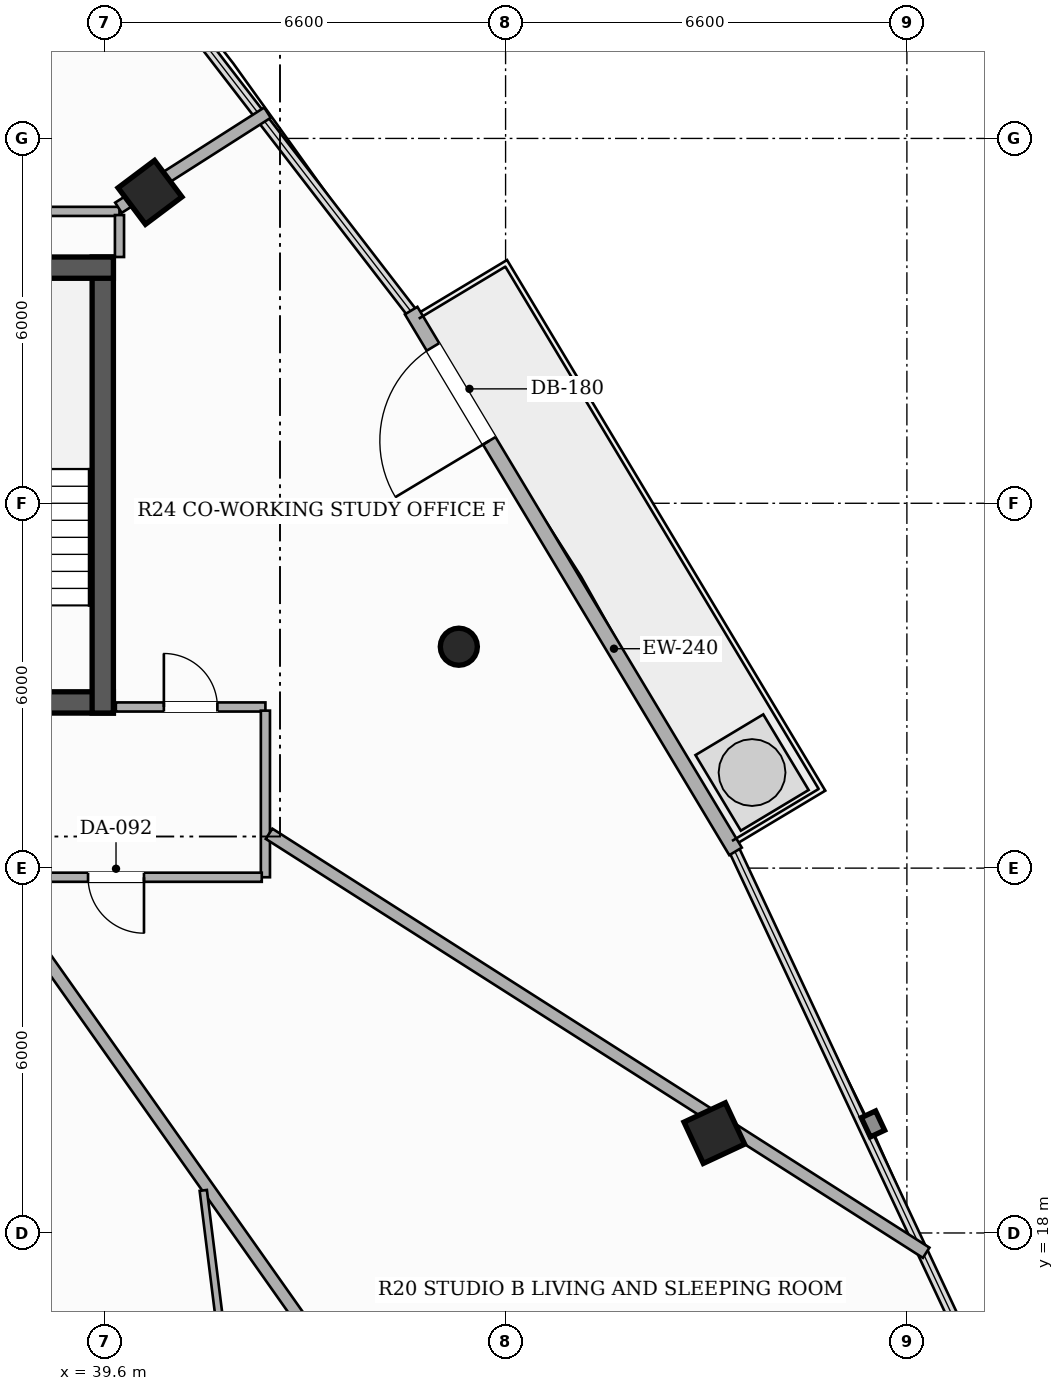
"""IFC4 building model, lengths in metres.
Left out: names, types, materials, properties, quantities, classifications, styles, units other than length and angle.
Written with IfcOpenShell. Run it as: python <this file> out.ifc"""

import sys

from ifc_helpers import new_model, si_unit, direction, frame, frame_2d, origin, origin_2d, place, context, subcontext, project, spatial, rectangle, hollow_rectangle, hollow_circle, extrude, element, fill, save


model = new_model("IFC4")
c1 = context("Model", 3, precision=1e-05, world=origin(), true_north=direction((0.0, 1.0)))
c2 = subcontext(c1, "Body", "Model", "MODEL_VIEW")
j1 = project(units=[si_unit("LENGTHUNIT", "METRE"), si_unit("PLANEANGLEUNIT", "RADIAN")], contexts=[c1])
p1 = place(None, origin())
s1 = spatial("IfcSite", under=j1, at=p1, CompositionType="ELEMENT")
p2 = place(p1, origin())
s2 = spatial("IfcBuilding", under=s1, at=p2, CompositionType="ELEMENT")
p3 = place(p2, frame((0.0, 0.0, 209.6)))
s3 = spatial("IfcBuildingStorey", under=s2, at=p3, CompositionType="ELEMENT", Elevation=209.6)
p4 = place(p3, frame((26.25, 26.725, 0.0), z_axis=(0.0, 0.0, 1.0), x_axis=(1.0, 0.0, 0.0)))
e1 = element("IfcWall", 1, at=p4, inside=s3, PredefinedType="SHEAR", context=c2, shape_type="SweptSolid", body=[
    extrude(rectangle(XDim=13.5, YDim=0.35, at=frame_2d((6.75, 0.0))), origin(), (0.0, 0.0, 1.0), 3.3),
])
p5 = place(p4, frame((4.35, 0.0, 0.0)))
e2 = element("IfcOpeningElement", 2, at=p5, cuts=e1, PredefinedType="OPENING", context=c2, shape_type="SweptSolid", body=[
    extrude(rectangle(XDim=1.05, YDim=2.15, at=frame_2d((0.525, 1.075))), frame((0.0, 0.185, 0.0), z_axis=(0.0, -1.0, 0.0), x_axis=(1.0, 0.0, 0.0)), (0.0, 0.0, 1.0), 0.37),
])
p6 = place(p4, frame((8.3, 0.0, 0.0)))
e3 = element("IfcOpeningElement", 3, at=p6, cuts=e1, PredefinedType="OPENING", context=c2, shape_type="SweptSolid", body=[
    extrude(rectangle(XDim=1.05, YDim=2.15, at=frame_2d((0.525, 1.075))), frame((0.0, 0.185, 0.0), z_axis=(0.0, -1.0, 0.0), x_axis=(1.0, 0.0, 0.0)), (0.0, 0.0, 1.0), 0.37),
])
p7 = place(p3, frame((39.575, 26.55, 0.0), z_axis=(0.0, 0.0, 1.0), x_axis=(0.0, 1.0, 0.0)))
e4 = element("IfcWall", 4, at=p7, inside=s3, PredefinedType="SHEAR", context=c2, shape_type="SweptSolid", body=[
    extrude(rectangle(XDim=7.5, YDim=0.35, at=frame_2d((3.75, 0.0))), origin(), (0.0, 0.0, 1.0), 3.3),
])
p8 = place(p3, frame((36.15, 33.875, 0.0), z_axis=(0.0, 0.0, 1.0), x_axis=(1.0, 0.0, 0.0)))
e5 = element("IfcWall", 5, at=p8, inside=s3, PredefinedType="SHEAR", context=c2, shape_type="SweptSolid", body=[
    extrude(rectangle(XDim=3.6, YDim=0.35, at=frame_2d((1.8, 0.0))), origin(), (0.0, 0.0, 1.0), 3.3),
])
p9 = place(p3, frame((49.633, 19.642, 0.0), z_axis=(0.0, 0.0, 1.0), x_axis=(-0.422618261741, 0.906307787037, 0.0)))
e6 = element("IfcColumn", 6, at=p9, inside=s3, PredefinedType="COLUMN", context=c2, shape_type="SweptSolid", body=[
    extrude(hollow_rectangle(XDim=0.75, YDim=0.75, WallThickness=0.025, at=origin_2d()), origin(), (0.0, 0.0, 1.0), 3.3),
])
p10 = place(p3, frame((45.431, 27.641, 0.0), z_axis=(0.0, 0.0, 1.0), x_axis=(1.0, 0.0, 0.0)))
e7 = element("IfcColumn", 7, at=p10, inside=s3, PredefinedType="COLUMN", context=c2, shape_type="SweptSolid", body=[
    extrude(hollow_circle(Radius=0.305, WallThickness=0.016, at=origin_2d()), origin(), (0.0, 0.0, 1.0), 3.3),
])
p11 = place(p3, frame((40.352, 35.113, 0.0), z_axis=(0.0, 0.0, 1.0), x_axis=(-0.600420225326, 0.799684658487, 0.0)))
e8 = element("IfcColumn", 8, at=p11, inside=s3, PredefinedType="COLUMN", context=c2, shape_type="SweptSolid", body=[
    extrude(hollow_rectangle(XDim=0.75, YDim=0.75, WallThickness=0.025, at=origin_2d()), origin(), (0.0, 0.0, 1.0), 3.3),
])
p12 = place(p3, frame((49.982, 24.275, 0.0), z_axis=(0.0, 0.0, 1.0), x_axis=(-0.514391899557, 0.857555230682, 0.0)))
e9 = element("IfcWall", 9, at=p12, inside=s3, PredefinedType="SOLIDWALL", context=c2, shape_type="SweptSolid", body=[
    extrude(rectangle(XDim=10.371, YDim=0.24, at=frame_2d((5.186, 0.0))), origin(), (0.0, 0.0, 1.0), 2.624),
])
p13 = place(p12, frame((7.874, 0.0, 0.0)))
e10 = element("IfcOpeningElement", 10, at=p13, cuts=e9, PredefinedType="OPENING", context=c2, shape_type="SweptSolid", body=[
    extrude(rectangle(XDim=1.8, YDim=2.2, at=frame_2d((0.9, 1.1))), frame((0.0, 0.13, 0.0), z_axis=(0.0, -1.0, 0.0), x_axis=(1.0, 0.0, 0.0)), (0.0, 0.0, 1.0), 0.26),
])
p14 = place(p3, frame((39.79, 26.65, 0.0), z_axis=(0.0, 0.0, 1.0), x_axis=(1.0, 0.0, 0.0)))
e11 = element("IfcWall", 11, at=p14, inside=s3, PredefinedType="PARTITIONING", context=c2, shape_type="SweptSolid", body=[
    extrude(rectangle(XDim=2.46, YDim=0.15, at=frame_2d((1.23, 0.0))), origin(), (0.0, 0.0, 1.0), 2.565),
])
p15 = place(p14, frame((0.79, 0.0, 0.0)))
e12 = element("IfcOpeningElement", 12, at=p15, cuts=e11, PredefinedType="OPENING", context=c2, shape_type="SweptSolid", body=[
    extrude(rectangle(XDim=0.88, YDim=2.1, at=frame_2d((0.44, 1.05))), frame((0.0, 0.085, 0.0), z_axis=(0.0, -1.0, 0.0), x_axis=(1.0, 0.0, 0.0)), (0.0, 0.0, 1.0), 0.17),
])
p16 = place(p3, frame((42.25, 26.59, 0.0), z_axis=(0.0, 0.0, 1.0), x_axis=(0.0, -1.0, 0.0)))
e13 = element("IfcWall", 13, at=p16, inside=s3, PredefinedType="PARTITIONING", context=c2, shape_type="SweptSolid", body=[
    extrude(rectangle(XDim=2.74, YDim=0.15, at=frame_2d((1.37, 0.0))), origin(), (0.0, 0.0, 1.0), 2.773),
])
p17 = place(p3, frame((42.19, 23.85, 0.0), z_axis=(0.0, 0.0, 1.0), x_axis=(-1.0, 0.0, 0.0)))
e14 = element("IfcWall", 14, at=p17, inside=s3, PredefinedType="PARTITIONING", context=c2, shape_type="SweptSolid", body=[
    extrude(rectangle(XDim=8.24, YDim=0.15, at=frame_2d((4.12, 0.0))), origin(), (0.0, 0.0, 1.0), 2.565),
])
p18 = place(p17, frame((1.937, 0.0, 0.0)))
e15 = element("IfcOpeningElement", 15, at=p18, cuts=e14, PredefinedType="OPENING", context=c2, shape_type="SweptSolid", body=[
    extrude(rectangle(XDim=0.92, YDim=2.15, at=frame_2d((0.46, 1.075))), frame((0.0, 0.085, 0.0), z_axis=(0.0, -1.0, 0.0), x_axis=(1.0, 0.0, 0.0)), (0.0, 0.0, 1.0), 0.17),
])
p19 = place(p17, frame((5.733, 0.0, 0.0)))
e16 = element("IfcOpeningElement", 16, at=p19, cuts=e14, PredefinedType="OPENING", context=c2, shape_type="SweptSolid", body=[
    extrude(rectangle(XDim=0.92, YDim=2.15, at=frame_2d((0.46, 1.075))), frame((0.0, 0.085, 0.0), z_axis=(0.0, -1.0, 0.0), x_axis=(1.0, 0.0, 0.0)), (0.0, 0.0, 1.0), 0.17),
])
p20 = place(p3, frame((36.31, 34.8, 0.0), z_axis=(0.0, 0.0, 1.0), x_axis=(1.0, 0.0, 0.0)))
e17 = element("IfcWall", 17, at=p20, inside=s3, PredefinedType="PARTITIONING", context=c2, shape_type="SweptSolid", body=[
    extrude(rectangle(XDim=3.54, YDim=0.15, at=frame_2d((1.77, 0.0))), origin(), (0.0, 0.0, 1.0), 2.425),
])
p21 = place(p3, frame((39.85, 34.74, 0.0), z_axis=(0.0, 0.0, 1.0), x_axis=(0.0, -1.0, 0.0)))
e18 = element("IfcWall", 18, at=p21, inside=s3, PredefinedType="PARTITIONING", context=c2, shape_type="SweptSolid", body=[
    extrude(rectangle(XDim=0.69, YDim=0.15, at=frame_2d((0.345, 0.0))), origin(), (0.0, 0.0, 1.0), 2.773),
])
p22 = place(p3, frame((50.316, 5.976, 0.0), z_axis=(0.0, 0.0, 1.0), x_axis=(-0.576784728977, 0.816896184603, 0.0)))
e19 = element("IfcWall", 19, at=p22, inside=s3, PredefinedType="PARTITIONING", context=c2, shape_type="SweptSolid", body=[
    extrude(rectangle(XDim=21.807, YDim=0.2, at=frame_2d((10.903, 0.0))), origin(), (0.0, 0.0, 1.0), 2.492),
])
p23 = place(p3, frame((42.31, 24.565, 0.0), z_axis=(0.0, 0.0, 1.0), x_axis=(0.843209388644, -0.537585274075, 0.0)))
e20 = element("IfcWall", 20, at=p23, inside=s3, PredefinedType="PARTITIONING", context=c2, shape_type="SweptSolid", body=[
    extrude(rectangle(XDim=12.816, YDim=0.2, at=frame_2d((6.408, 0.0))), origin(), (0.0, 0.0, 1.0), 2.492),
])
p24 = place(p3, frame((39.833, 34.86, 0.0), z_axis=(0.0, 0.0, 1.0), x_axis=(0.842993506682, 0.537923737803, 0.0)))
e21 = element("IfcWall", 21, at=p24, inside=s3, PredefinedType="PARTITIONING", context=c2, shape_type="SweptSolid", body=[
    extrude(rectangle(XDim=2.907, YDim=0.2, at=frame_2d((1.454, 0.0))), origin(), (0.0, 0.0, 1.0), 2.492),
])
p25 = place(p3, frame((41.228, 18.7, 0.0), z_axis=(0.0, 0.0, 1.0), x_axis=(0.123731094195, -0.992315784581, 0.0)))
e22 = element("IfcWall", 22, at=p25, inside=s3, PredefinedType="PARTITIONING", context=c2, shape_type="SweptSolid", body=[
    extrude(rectangle(XDim=6.432, YDim=0.12, at=frame_2d((3.216, 0.0))), origin(), (0.0, 0.0, 1.0), 3.06),
])
p26 = place(p25, frame((2.806, 0.0, 0.0)))
e23 = element("IfcOpeningElement", 23, at=p26, cuts=e22, PredefinedType="OPENING", context=c2, shape_type="SweptSolid", body=[
    extrude(rectangle(XDim=0.82, YDim=2.1, at=frame_2d((0.41, 1.05))), frame((0.0, 0.07, 0.0), z_axis=(0.0, -1.0, 0.0), x_axis=(1.0, 0.0, 0.0)), (0.0, 0.0, 1.0), 0.14),
])
p27 = place(p13, origin())
e24 = element("IfcDoor", 24, at=p27, inside=s3, OperationType="SINGLE_SWING_LEFT", PredefinedType="DOOR", context=c2, shape_type="SweptSolid", body=[
    extrude(rectangle(XDim=1.8, YDim=2.2, at=frame_2d((0.9, 1.1))), frame((0.0, 0.025, 0.0), z_axis=(0.0, -1.0, 0.0), x_axis=(1.0, 0.0, 0.0)), (0.0, 0.0, 1.0), 0.05),
])
fill(e10, e24)
p28 = place(p18, origin())
e25 = element("IfcDoor", 25, at=p28, inside=s3, OperationType="SINGLE_SWING_LEFT", PredefinedType="DOOR", context=c2, shape_type="SweptSolid", body=[
    extrude(rectangle(XDim=0.92, YDim=2.15, at=frame_2d((0.46, 1.075))), frame((0.0, 0.025, 0.0), z_axis=(0.0, -1.0, 0.0), x_axis=(1.0, 0.0, 0.0)), (0.0, 0.0, 1.0), 0.05),
])
fill(e15, e25)
p29 = place(p15, origin())
e26 = element("IfcDoor", 26, at=p29, inside=s3, OperationType="SINGLE_SWING_LEFT", PredefinedType="DOOR", context=c2, shape_type="SweptSolid", body=[
    extrude(rectangle(XDim=0.88, YDim=2.1, at=frame_2d((0.44, 1.05))), frame((0.0, 0.025, 0.0), z_axis=(0.0, -1.0, 0.0), x_axis=(1.0, 0.0, 0.0)), (0.0, 0.0, 1.0), 0.05),
])
fill(e12, e26)
save(model, sys.argv[1])
